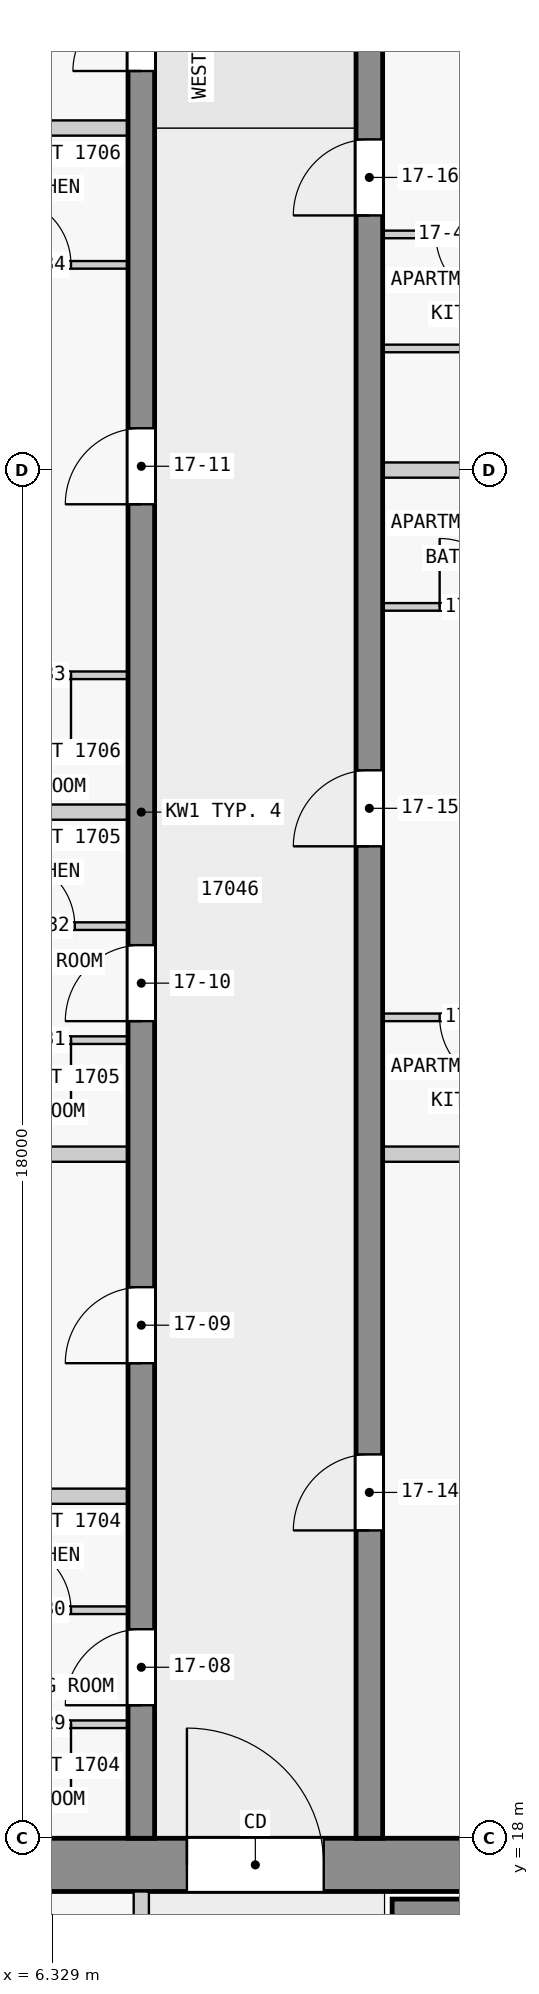
"""IFC4 building model, lengths in metres.
Left out: names, types, materials, properties, quantities, classifications, styles, units other than length and angle.
Written with IfcOpenShell. Run it as: python <this file> out.ifc"""

import sys

from ifc_helpers import new_model, si_unit, direction, frame, frame_2d, origin, place, context, subcontext, project, spatial, rectangle, extrude, element, fill, save


model = new_model("IFC4")
c1 = context("Model", 3, precision=1e-05, world=origin(), true_north=direction((0.0, 1.0)))
c2 = subcontext(c1, "Body", "Model", "MODEL_VIEW")
j1 = project(units=[si_unit("LENGTHUNIT", "METRE"), si_unit("PLANEANGLEUNIT", "RADIAN")], contexts=[c1])
p1 = place(None, origin())
s1 = spatial("IfcSite", under=j1, at=p1, CompositionType="ELEMENT")
p2 = place(p1, origin())
s2 = spatial("IfcBuilding", under=s1, at=p2, CompositionType="ELEMENT")
p3 = place(p2, frame((0.0, 0.0, 68.8)))
s3 = spatial("IfcBuildingStorey", under=s2, at=p3, CompositionType="ELEMENT", Elevation=68.8)
p4 = place(p3, frame((1.6, 17.65, 0.0), z_axis=(0.0, 0.0, 1.0), x_axis=(1.0, 0.0, 0.0)))
e1 = element("IfcWall", 1, at=p4, inside=s3, PredefinedType="SHEAR", context=c2, shape_type="SweptSolid", body=[
    extrude(rectangle(XDim=20.9, YDim=0.7, at=frame_2d((10.45, 0.0))), origin(), (0.0, 0.0, 1.0), 3.2),
])
p5 = place(p4, frame((6.5, 0.0, 0.0)))
e2 = element("IfcOpeningElement", 2, at=p5, cuts=e1, PredefinedType="OPENING", context=c2, shape_type="SweptSolid", body=[
    extrude(rectangle(XDim=1.8, YDim=2.1, at=frame_2d((0.9, 1.05))), frame((0.0, 0.36, 0.0), z_axis=(0.0, -1.0, 0.0), x_axis=(1.0, 0.0, 0.0)), (0.0, 0.0, 1.0), 0.72),
])
p6 = place(p3, frame((10.8, 17.05, 0.0), z_axis=(0.0, 0.0, 1.0), x_axis=(1.0, 0.0, 0.0)))
e3 = element("IfcWall", 3, at=p6, inside=s3, PredefinedType="SHEAR", context=c2, shape_type="SweptSolid", body=[
    extrude(rectangle(XDim=7.8, YDim=0.3, at=frame_2d((3.9, 0.0))), origin(), (0.0, 0.0, 1.0), 3.2),
])
p7 = place(p3, frame((7.5, 18.0, 0.0), z_axis=(0.0, 0.0, 1.0), x_axis=(0.0, 1.0, 0.0)))
e4 = element("IfcWall", 4, at=p7, inside=s3, PredefinedType="SHEAR", context=c2, shape_type="SweptSolid", body=[
    extrude(rectangle(XDim=27.0, YDim=0.35, at=frame_2d((13.5, 0.0))), origin(), (0.0, 0.0, 1.0), 3.2),
])
p8 = place(p7, frame((1.75, 0.0, 0.0)))
e5 = element("IfcOpeningElement", 5, at=p8, cuts=e4, PredefinedType="OPENING", context=c2, shape_type="SweptSolid", body=[
    extrude(rectangle(XDim=1.0, YDim=2.1, at=frame_2d((0.5, 1.05))), frame((0.0, 0.185, 0.0), z_axis=(0.0, -1.0, 0.0), x_axis=(1.0, 0.0, 0.0)), (0.0, 0.0, 1.0), 0.37),
])
p9 = place(p7, frame((6.25, 0.0, 0.0)))
e6 = element("IfcOpeningElement", 6, at=p9, cuts=e4, PredefinedType="OPENING", context=c2, shape_type="SweptSolid", body=[
    extrude(rectangle(XDim=1.0, YDim=2.1, at=frame_2d((0.5, 1.05))), frame((0.0, 0.185, 0.0), z_axis=(0.0, -1.0, 0.0), x_axis=(1.0, 0.0, 0.0)), (0.0, 0.0, 1.0), 0.37),
])
p10 = place(p7, frame((10.75, 0.0, 0.0)))
e7 = element("IfcOpeningElement", 7, at=p10, cuts=e4, PredefinedType="OPENING", context=c2, shape_type="SweptSolid", body=[
    extrude(rectangle(XDim=1.0, YDim=2.1, at=frame_2d((0.5, 1.05))), frame((0.0, 0.185, 0.0), z_axis=(0.0, -1.0, 0.0), x_axis=(1.0, 0.0, 0.0)), (0.0, 0.0, 1.0), 0.37),
])
p11 = place(p7, frame((17.55, 0.0, 0.0)))
e8 = element("IfcOpeningElement", 8, at=p11, cuts=e4, PredefinedType="OPENING", context=c2, shape_type="SweptSolid", body=[
    extrude(rectangle(XDim=1.0, YDim=2.1, at=frame_2d((0.5, 1.05))), frame((0.0, 0.185, 0.0), z_axis=(0.0, -1.0, 0.0), x_axis=(1.0, 0.0, 0.0)), (0.0, 0.0, 1.0), 0.37),
])
p12 = place(p7, frame((23.25, 0.0, 0.0)))
e9 = element("IfcOpeningElement", 9, at=p12, cuts=e4, PredefinedType="OPENING", context=c2, shape_type="SweptSolid", body=[
    extrude(rectangle(XDim=0.9, YDim=2.1, at=frame_2d((0.45, 1.05))), frame((0.0, 0.185, 0.0), z_axis=(0.0, -1.0, 0.0), x_axis=(1.0, 0.0, 0.0)), (0.0, 0.0, 1.0), 0.37),
])
p13 = place(p7, frame((25.45, 0.0, 0.0)))
e10 = element("IfcOpeningElement", 10, at=p13, cuts=e4, PredefinedType="OPENING", context=c2, shape_type="SweptSolid", body=[
    extrude(rectangle(XDim=1.0, YDim=2.1, at=frame_2d((0.5, 1.05))), frame((0.0, 0.185, 0.0), z_axis=(0.0, -1.0, 0.0), x_axis=(1.0, 0.0, 0.0)), (0.0, 0.0, 1.0), 0.37),
])
p14 = place(p3, frame((10.5, 18.0, 0.0), z_axis=(0.0, 0.0, 1.0), x_axis=(0.0, 1.0, 0.0)))
e11 = element("IfcWall", 11, at=p14, inside=s3, PredefinedType="SHEAR", context=c2, shape_type="SweptSolid", body=[
    extrude(rectangle(XDim=27.0, YDim=0.35, at=frame_2d((13.5, 0.0))), origin(), (0.0, 0.0, 1.0), 3.2),
])
p15 = place(p14, frame((4.05, 0.0, 0.0)))
e12 = element("IfcOpeningElement", 12, at=p15, cuts=e11, PredefinedType="OPENING", context=c2, shape_type="SweptSolid", body=[
    extrude(rectangle(XDim=1.0, YDim=2.1, at=frame_2d((0.5, 1.05))), frame((0.0, 0.185, 0.0), z_axis=(0.0, -1.0, 0.0), x_axis=(1.0, 0.0, 0.0)), (0.0, 0.0, 1.0), 0.37),
])
p16 = place(p14, frame((13.05, 0.0, 0.0)))
e13 = element("IfcOpeningElement", 13, at=p16, cuts=e11, PredefinedType="OPENING", context=c2, shape_type="SweptSolid", body=[
    extrude(rectangle(XDim=1.0, YDim=2.1, at=frame_2d((0.5, 1.05))), frame((0.0, 0.185, 0.0), z_axis=(0.0, -1.0, 0.0), x_axis=(1.0, 0.0, 0.0)), (0.0, 0.0, 1.0), 0.37),
])
p17 = place(p14, frame((21.35, 0.0, 0.0)))
e14 = element("IfcOpeningElement", 14, at=p17, cuts=e11, PredefinedType="OPENING", context=c2, shape_type="SweptSolid", body=[
    extrude(rectangle(XDim=1.0, YDim=2.1, at=frame_2d((0.5, 1.05))), frame((0.0, 0.185, 0.0), z_axis=(0.0, -1.0, 0.0), x_axis=(1.0, 0.0, 0.0)), (0.0, 0.0, 1.0), 0.37),
])
p18 = place(p3, frame((7.5, 10.1, 0.0), z_axis=(0.0, 0.0, 1.0), x_axis=(0.0, 1.0, 0.0)))
e15 = element("IfcWall", 15, at=p18, inside=s3, PredefinedType="PARTITIONING", context=c2, shape_type="SweptSolid", body=[
    extrude(rectangle(XDim=7.2, YDim=0.2, at=frame_2d((3.6, 0.0))), origin(), (0.0, 0.0, 1.0), 3.2),
])
p19 = place(p18, frame((0.75, 0.0, 0.0)))
e16 = element("IfcOpeningElement", 16, at=p19, cuts=e15, PredefinedType="OPENING", context=c2, shape_type="SweptSolid", body=[
    extrude(rectangle(XDim=0.9, YDim=2.1, at=frame_2d((0.45, 1.05))), frame((0.0, 0.11, 0.0), z_axis=(0.0, -1.0, 0.0), x_axis=(1.0, 0.0, 0.0)), (0.0, 0.0, 1.0), 0.22),
])
p20 = place(p18, frame((4.35, 0.0, 0.0)))
e17 = element("IfcOpeningElement", 17, at=p20, cuts=e15, PredefinedType="OPENING", context=c2, shape_type="SweptSolid", body=[
    extrude(rectangle(XDim=0.9, YDim=2.1, at=frame_2d((0.45, 1.05))), frame((0.0, 0.11, 0.0), z_axis=(0.0, -1.0, 0.0), x_axis=(1.0, 0.0, 0.0)), (0.0, 0.0, 1.0), 0.22),
])
p21 = place(p3, frame((7.325, 19.5, 0.0), z_axis=(0.0, 0.0, 1.0), x_axis=(-1.0, 0.0, 0.0)))
e18 = element("IfcWall", 18, at=p21, inside=s3, PredefinedType="PARTITIONING", context=c2, shape_type="SweptSolid", body=[
    extrude(rectangle(XDim=2.4, YDim=0.1, at=frame_2d((1.2, 0.0))), origin(), (0.0, 0.0, 1.0), 3.2),
])
p22 = place(p21, frame((0.75, 0.0, 0.0)))
e19 = element("IfcOpeningElement", 19, at=p22, cuts=e18, PredefinedType="OPENING", context=c2, shape_type="SweptSolid", body=[
    extrude(rectangle(XDim=0.9, YDim=2.1, at=frame_2d((0.45, 1.05))), frame((0.0, 0.06, 0.0), z_axis=(0.0, -1.0, 0.0), x_axis=(1.0, 0.0, 0.0)), (0.0, 0.0, 1.0), 0.12),
])
p23 = place(p3, frame((4.925, 21.0, 0.0), z_axis=(0.0, 0.0, 1.0), x_axis=(1.0, 0.0, 0.0)))
e20 = element("IfcWall", 20, at=p23, inside=s3, PredefinedType="PARTITIONING", context=c2, shape_type="SweptSolid", body=[
    extrude(rectangle(XDim=2.4, YDim=0.1, at=frame_2d((1.2, 0.0))), origin(), (0.0, 0.0, 1.0), 3.2),
])
p24 = place(p23, frame((0.75, 0.0, 0.0)))
e21 = element("IfcOpeningElement", 21, at=p24, cuts=e20, PredefinedType="OPENING", context=c2, shape_type="SweptSolid", body=[
    extrude(rectangle(XDim=0.9, YDim=2.1, at=frame_2d((0.45, 1.05))), frame((0.0, 0.06, 0.0), z_axis=(0.0, -1.0, 0.0), x_axis=(1.0, 0.0, 0.0)), (0.0, 0.0, 1.0), 0.12),
])
p25 = place(p3, frame((7.325, 22.5, 0.0), z_axis=(0.0, 0.0, 1.0), x_axis=(-1.0, 0.0, 0.0)))
e22 = element("IfcWall", 22, at=p25, inside=s3, PredefinedType="PARTITIONING", context=c2, shape_type="SweptSolid", body=[
    extrude(rectangle(XDim=2.3, YDim=0.2, at=frame_2d((1.15, 0.0))), origin(), (0.0, 0.0, 1.0), 3.2),
])
for number, where, z_axis, x_axis in (
    (23, (7.325, 27.0, 0.0), (0.0, 0.0, 1.0), (-1.0, 0.0, 0.0)),
    (24, (18.08, 27.0, 0.0), (0.0, 0.0, 1.0), (-1.0, 0.0, 0.0)),
):
    element("IfcWall", number, at=place(p3, frame(where, z_axis=z_axis, x_axis=x_axis)), inside=s3, PredefinedType="PARTITIONING", context=c2, shape_type="SweptSolid", body=[
        extrude(rectangle(XDim=7.405, YDim=0.2, at=frame_2d((3.703, 0.0))), origin(), (0.0, 0.0, 1.0), 3.2),
    ])
p26 = place(p3, frame((7.325, 28.5, 0.0), z_axis=(0.0, 0.0, 1.0), x_axis=(-1.0, 0.0, 0.0)))
e25 = element("IfcWall", 25, at=p26, inside=s3, PredefinedType="PARTITIONING", context=c2, shape_type="SweptSolid", body=[
    extrude(rectangle(XDim=2.4, YDim=0.1, at=frame_2d((1.2, 0.0))), origin(), (0.0, 0.0, 1.0), 3.2),
])
p27 = place(p26, frame((0.75, 0.0, 0.0)))
e26 = element("IfcOpeningElement", 26, at=p27, cuts=e25, PredefinedType="OPENING", context=c2, shape_type="SweptSolid", body=[
    extrude(rectangle(XDim=0.9, YDim=2.1, at=frame_2d((0.45, 1.05))), frame((0.0, 0.06, 0.0), z_axis=(0.0, -1.0, 0.0), x_axis=(1.0, 0.0, 0.0)), (0.0, 0.0, 1.0), 0.12),
])
p28 = place(p3, frame((13.075, 28.8, 0.0), z_axis=(0.0, 0.0, 1.0), x_axis=(-1.0, 0.0, 0.0)))
e27 = element("IfcWall", 27, at=p28, inside=s3, PredefinedType="PARTITIONING", context=c2, shape_type="SweptSolid", body=[
    extrude(rectangle(XDim=2.4, YDim=0.1, at=frame_2d((1.2, 0.0))), origin(), (0.0, 0.0, 1.0), 3.2),
])
p29 = place(p28, frame((0.75, 0.0, 0.0)))
e28 = element("IfcOpeningElement", 28, at=p29, cuts=e27, PredefinedType="OPENING", context=c2, shape_type="SweptSolid", body=[
    extrude(rectangle(XDim=0.9, YDim=2.1, at=frame_2d((0.45, 1.05))), frame((0.0, 0.06, 0.0), z_axis=(0.0, -1.0, 0.0), x_axis=(1.0, 0.0, 0.0)), (0.0, 0.0, 1.0), 0.12),
])
p30 = place(p3, frame((4.975, 30.0, 0.0), z_axis=(0.0, 0.0, 1.0), x_axis=(1.0, 0.0, 0.0)))
e29 = element("IfcWall", 29, at=p30, inside=s3, PredefinedType="PARTITIONING", context=c2, shape_type="SweptSolid", body=[
    extrude(rectangle(XDim=2.35, YDim=0.1, at=frame_2d((1.175, 0.0))), origin(), (0.0, 0.0, 1.0), 3.2),
])
p31 = place(p30, frame((0.75, 0.0, 0.0)))
e30 = element("IfcOpeningElement", 30, at=p31, cuts=e29, PredefinedType="OPENING", context=c2, shape_type="SweptSolid", body=[
    extrude(rectangle(XDim=0.9, YDim=2.1, at=frame_2d((0.45, 1.05))), frame((0.0, 0.06, 0.0), z_axis=(0.0, -1.0, 0.0), x_axis=(1.0, 0.0, 0.0)), (0.0, 0.0, 1.0), 0.12),
])
p32 = place(p3, frame((7.325, 31.5, 0.0), z_axis=(0.0, 0.0, 1.0), x_axis=(-1.0, 0.0, 0.0)))
e31 = element("IfcWall", 31, at=p32, inside=s3, PredefinedType="PARTITIONING", context=c2, shape_type="SweptSolid", body=[
    extrude(rectangle(XDim=2.3, YDim=0.2, at=frame_2d((1.15, 0.0))), origin(), (0.0, 0.0, 1.0), 3.2),
])
p33 = place(p3, frame((7.325, 33.3, 0.0), z_axis=(0.0, 0.0, 1.0), x_axis=(-1.0, 0.0, 0.0)))
e32 = element("IfcWall", 32, at=p33, inside=s3, PredefinedType="PARTITIONING", context=c2, shape_type="SweptSolid", body=[
    extrude(rectangle(XDim=2.35, YDim=0.1, at=frame_2d((1.175, 0.0))), origin(), (0.0, 0.0, 1.0), 3.2),
])
p34 = place(p33, frame((0.75, 0.0, 0.0)))
e33 = element("IfcOpeningElement", 33, at=p34, cuts=e32, PredefinedType="OPENING", context=c2, shape_type="SweptSolid", body=[
    extrude(rectangle(XDim=0.9, YDim=2.1, at=frame_2d((0.45, 1.05))), frame((0.0, 0.06, 0.0), z_axis=(0.0, -1.0, 0.0), x_axis=(1.0, 0.0, 0.0)), (0.0, 0.0, 1.0), 0.12),
])
p35 = place(p3, frame((10.675, 34.2, 0.0), z_axis=(0.0, 0.0, 1.0), x_axis=(1.0, 0.0, 0.0)))
e34 = element("IfcWall", 34, at=p35, inside=s3, PredefinedType="PARTITIONING", context=c2, shape_type="SweptSolid", body=[
    extrude(rectangle(XDim=2.35, YDim=0.1, at=frame_2d((1.175, 0.0))), origin(), (0.0, 0.0, 1.0), 3.2),
])
p36 = place(p35, frame((0.75, 0.0, 0.0)))
e35 = element("IfcOpeningElement", 35, at=p36, cuts=e34, PredefinedType="OPENING", context=c2, shape_type="SweptSolid", body=[
    extrude(rectangle(XDim=0.9, YDim=2.1, at=frame_2d((0.45, 1.05))), frame((0.0, 0.06, 0.0), z_axis=(0.0, -1.0, 0.0), x_axis=(1.0, 0.0, 0.0)), (0.0, 0.0, 1.0), 0.12),
])
p37 = place(p3, frame((16.6, 36.0, 0.0), z_axis=(0.0, 0.0, 1.0), x_axis=(-1.0, 0.0, 0.0)))
e36 = element("IfcWall", 36, at=p37, inside=s3, PredefinedType="PARTITIONING", context=c2, shape_type="SweptSolid", body=[
    extrude(rectangle(XDim=5.925, YDim=0.2, at=frame_2d((2.962, 0.0))), origin(), (0.0, 0.0, 1.0), 3.2),
])
p38 = place(p3, frame((13.025, 37.6, 0.0), z_axis=(0.0, 0.0, 1.0), x_axis=(-1.0, 0.0, 0.0)))
e37 = element("IfcWall", 37, at=p38, inside=s3, PredefinedType="PARTITIONING", context=c2, shape_type="SweptSolid", body=[
    extrude(rectangle(XDim=2.35, YDim=0.1, at=frame_2d((1.175, 0.0))), origin(), (0.0, 0.0, 1.0), 3.2),
])
p39 = place(p3, frame((4.925, 38.7, 0.0), z_axis=(0.0, 0.0, 1.0), x_axis=(1.0, 0.0, 0.0)))
e38 = element("IfcWall", 38, at=p39, inside=s3, PredefinedType="PARTITIONING", context=c2, shape_type="SweptSolid", body=[
    extrude(rectangle(XDim=2.4, YDim=0.1, at=frame_2d((1.2, 0.0))), origin(), (0.0, 0.0, 1.0), 3.2),
])
p40 = place(p39, frame((0.75, 0.0, 0.0)))
e39 = element("IfcOpeningElement", 39, at=p40, cuts=e38, PredefinedType="OPENING", context=c2, shape_type="SweptSolid", body=[
    extrude(rectangle(XDim=0.9, YDim=2.1, at=frame_2d((0.45, 1.05))), frame((0.0, 0.06, 0.0), z_axis=(0.0, -1.0, 0.0), x_axis=(1.0, 0.0, 0.0)), (0.0, 0.0, 1.0), 0.12),
])
p41 = place(p3, frame((13.025, 39.1, 0.0), z_axis=(0.0, 0.0, 1.0), x_axis=(-1.0, 0.0, 0.0)))
e40 = element("IfcWall", 40, at=p41, inside=s3, PredefinedType="PARTITIONING", context=c2, shape_type="SweptSolid", body=[
    extrude(rectangle(XDim=2.35, YDim=0.1, at=frame_2d((1.175, 0.0))), origin(), (0.0, 0.0, 1.0), 3.2),
])
p42 = place(p41, frame((0.75, 0.0, 0.0)))
e41 = element("IfcOpeningElement", 41, at=p42, cuts=e40, PredefinedType="OPENING", context=c2, shape_type="SweptSolid", body=[
    extrude(rectangle(XDim=0.9, YDim=2.1, at=frame_2d((0.45, 1.05))), frame((0.0, 0.06, 0.0), z_axis=(0.0, -1.0, 0.0), x_axis=(1.0, 0.0, 0.0)), (0.0, 0.0, 1.0), 0.12),
])
p43 = place(p3, frame((7.325, 40.5, 0.0), z_axis=(0.0, 0.0, 1.0), x_axis=(-1.0, 0.0, 0.0)))
e42 = element("IfcWall", 42, at=p43, inside=s3, PredefinedType="PARTITIONING", context=c2, shape_type="SweptSolid", body=[
    extrude(rectangle(XDim=2.3, YDim=0.2, at=frame_2d((1.15, 0.0))), origin(), (0.0, 0.0, 1.0), 3.2),
])
p44 = place(p5, origin())
e43 = element("IfcDoor", 43, at=p44, inside=s3, OperationType="DOUBLE_DOOR_SINGLE_SWING", PredefinedType="DOOR", context=c2, shape_type="SweptSolid", body=[
    extrude(rectangle(XDim=1.8, YDim=2.1, at=frame_2d((0.9, 1.05))), frame((0.0, 0.025, 0.0), z_axis=(0.0, -1.0, 0.0), x_axis=(1.0, 0.0, 0.0)), (0.0, 0.0, 1.0), 0.05),
])
fill(e2, e43)
p45 = place(p8, origin())
e44 = element("IfcDoor", 44, at=p45, inside=s3, OperationType="SINGLE_SWING_LEFT", PredefinedType="DOOR", context=c2, shape_type="SweptSolid", body=[
    extrude(rectangle(XDim=1.0, YDim=2.1, at=frame_2d((0.5, 1.05))), frame((0.0, 0.025, 0.0), z_axis=(0.0, -1.0, 0.0), x_axis=(1.0, 0.0, 0.0)), (0.0, 0.0, 1.0), 0.05),
])
fill(e5, e44)
p46 = place(p9, origin())
e45 = element("IfcDoor", 45, at=p46, inside=s3, OperationType="SINGLE_SWING_LEFT", PredefinedType="DOOR", context=c2, shape_type="SweptSolid", body=[
    extrude(rectangle(XDim=1.0, YDim=2.1, at=frame_2d((0.5, 1.05))), frame((0.0, 0.025, 0.0), z_axis=(0.0, -1.0, 0.0), x_axis=(1.0, 0.0, 0.0)), (0.0, 0.0, 1.0), 0.05),
])
fill(e6, e45)
p47 = place(p10, origin())
e46 = element("IfcDoor", 46, at=p47, inside=s3, OperationType="SINGLE_SWING_LEFT", PredefinedType="DOOR", context=c2, shape_type="SweptSolid", body=[
    extrude(rectangle(XDim=1.0, YDim=2.1, at=frame_2d((0.5, 1.05))), frame((0.0, 0.025, 0.0), z_axis=(0.0, -1.0, 0.0), x_axis=(1.0, 0.0, 0.0)), (0.0, 0.0, 1.0), 0.05),
])
fill(e7, e46)
p48 = place(p11, origin())
e47 = element("IfcDoor", 47, at=p48, inside=s3, OperationType="SINGLE_SWING_RIGHT", PredefinedType="DOOR", context=c2, shape_type="SweptSolid", body=[
    extrude(rectangle(XDim=1.0, YDim=2.1, at=frame_2d((0.5, 1.05))), frame((0.0, 0.025, 0.0), z_axis=(0.0, -1.0, 0.0), x_axis=(1.0, 0.0, 0.0)), (0.0, 0.0, 1.0), 0.05),
])
fill(e8, e47)
p49 = place(p12, origin())
e48 = element("IfcDoor", 48, at=p49, inside=s3, OperationType="SINGLE_SWING_RIGHT", PredefinedType="DOOR", context=c2, shape_type="SweptSolid", body=[
    extrude(rectangle(XDim=0.9, YDim=2.1, at=frame_2d((0.45, 1.05))), frame((0.0, 0.025, 0.0), z_axis=(0.0, -1.0, 0.0), x_axis=(1.0, 0.0, 0.0)), (0.0, 0.0, 1.0), 0.05),
])
fill(e9, e48)
p50 = place(p15, origin())
e49 = element("IfcDoor", 49, at=p50, inside=s3, OperationType="SINGLE_SWING_LEFT", PredefinedType="DOOR", context=c2, shape_type="SweptSolid", body=[
    extrude(rectangle(XDim=1.0, YDim=2.1, at=frame_2d((0.5, 1.05))), frame((0.0, 0.025, 0.0), z_axis=(0.0, -1.0, 0.0), x_axis=(1.0, 0.0, 0.0)), (0.0, 0.0, 1.0), 0.05),
])
fill(e12, e49)
p51 = place(p16, origin())
e50 = element("IfcDoor", 50, at=p51, inside=s3, OperationType="SINGLE_SWING_RIGHT", PredefinedType="DOOR", context=c2, shape_type="SweptSolid", body=[
    extrude(rectangle(XDim=1.0, YDim=2.1, at=frame_2d((0.5, 1.05))), frame((0.0, 0.025, 0.0), z_axis=(0.0, -1.0, 0.0), x_axis=(1.0, 0.0, 0.0)), (0.0, 0.0, 1.0), 0.05),
])
fill(e13, e50)
p52 = place(p17, origin())
e51 = element("IfcDoor", 51, at=p52, inside=s3, OperationType="SINGLE_SWING_RIGHT", PredefinedType="DOOR", context=c2, shape_type="SweptSolid", body=[
    extrude(rectangle(XDim=1.0, YDim=2.1, at=frame_2d((0.5, 1.05))), frame((0.0, 0.025, 0.0), z_axis=(0.0, -1.0, 0.0), x_axis=(1.0, 0.0, 0.0)), (0.0, 0.0, 1.0), 0.05),
])
fill(e14, e51)
p53 = place(p22, origin())
e52 = element("IfcDoor", 52, at=p53, inside=s3, OperationType="SINGLE_SWING_LEFT", PredefinedType="DOOR", context=c2, shape_type="SweptSolid", body=[
    extrude(rectangle(XDim=0.9, YDim=2.1, at=frame_2d((0.45, 1.05))), frame((0.0, 0.025, 0.0), z_axis=(0.0, -1.0, 0.0), x_axis=(1.0, 0.0, 0.0)), (0.0, 0.0, 1.0), 0.05),
])
fill(e19, e52)
p54 = place(p24, origin())
e53 = element("IfcDoor", 53, at=p54, inside=s3, OperationType="SINGLE_SWING_LEFT", PredefinedType="DOOR", context=c2, shape_type="SweptSolid", body=[
    extrude(rectangle(XDim=0.9, YDim=2.1, at=frame_2d((0.45, 1.05))), frame((0.0, 0.025, 0.0), z_axis=(0.0, -1.0, 0.0), x_axis=(1.0, 0.0, 0.0)), (0.0, 0.0, 1.0), 0.05),
])
fill(e21, e53)
p55 = place(p27, origin())
e54 = element("IfcDoor", 54, at=p55, inside=s3, OperationType="SINGLE_SWING_LEFT", PredefinedType="DOOR", context=c2, shape_type="SweptSolid", body=[
    extrude(rectangle(XDim=0.9, YDim=2.1, at=frame_2d((0.45, 1.05))), frame((0.0, 0.025, 0.0), z_axis=(0.0, -1.0, 0.0), x_axis=(1.0, 0.0, 0.0)), (0.0, 0.0, 1.0), 0.05),
])
fill(e26, e54)
p56 = place(p31, origin())
e55 = element("IfcDoor", 55, at=p56, inside=s3, OperationType="SINGLE_SWING_RIGHT", PredefinedType="DOOR", context=c2, shape_type="SweptSolid", body=[
    extrude(rectangle(XDim=0.9, YDim=2.1, at=frame_2d((0.45, 1.05))), frame((0.0, 0.025, 0.0), z_axis=(0.0, -1.0, 0.0), x_axis=(1.0, 0.0, 0.0)), (0.0, 0.0, 1.0), 0.05),
])
fill(e30, e55)
p57 = place(p34, origin())
e56 = element("IfcDoor", 56, at=p57, inside=s3, OperationType="SINGLE_SWING_RIGHT", PredefinedType="DOOR", context=c2, shape_type="SweptSolid", body=[
    extrude(rectangle(XDim=0.9, YDim=2.1, at=frame_2d((0.45, 1.05))), frame((0.0, 0.025, 0.0), z_axis=(0.0, -1.0, 0.0), x_axis=(1.0, 0.0, 0.0)), (0.0, 0.0, 1.0), 0.05),
])
fill(e33, e56)
p58 = place(p40, origin())
e57 = element("IfcDoor", 57, at=p58, inside=s3, OperationType="SINGLE_SWING_LEFT", PredefinedType="DOOR", context=c2, shape_type="SweptSolid", body=[
    extrude(rectangle(XDim=0.9, YDim=2.1, at=frame_2d((0.45, 1.05))), frame((0.0, 0.025, 0.0), z_axis=(0.0, -1.0, 0.0), x_axis=(1.0, 0.0, 0.0)), (0.0, 0.0, 1.0), 0.05),
])
fill(e39, e57)
p59 = place(p29, origin())
e58 = element("IfcDoor", 58, at=p59, inside=s3, OperationType="SINGLE_SWING_RIGHT", PredefinedType="DOOR", context=c2, shape_type="SweptSolid", body=[
    extrude(rectangle(XDim=0.9, YDim=2.1, at=frame_2d((0.45, 1.05))), frame((0.0, 0.025, 0.0), z_axis=(0.0, -1.0, 0.0), x_axis=(1.0, 0.0, 0.0)), (0.0, 0.0, 1.0), 0.05),
])
fill(e28, e58)
p60 = place(p36, origin())
e59 = element("IfcDoor", 59, at=p60, inside=s3, OperationType="SINGLE_SWING_RIGHT", PredefinedType="DOOR", context=c2, shape_type="SweptSolid", body=[
    extrude(rectangle(XDim=0.9, YDim=2.1, at=frame_2d((0.45, 1.05))), frame((0.0, 0.025, 0.0), z_axis=(0.0, -1.0, 0.0), x_axis=(1.0, 0.0, 0.0)), (0.0, 0.0, 1.0), 0.05),
])
fill(e35, e59)
p61 = place(p42, origin())
e60 = element("IfcDoor", 60, at=p61, inside=s3, OperationType="SINGLE_SWING_RIGHT", PredefinedType="DOOR", context=c2, shape_type="SweptSolid", body=[
    extrude(rectangle(XDim=0.9, YDim=2.1, at=frame_2d((0.45, 1.05))), frame((0.0, 0.025, 0.0), z_axis=(0.0, -1.0, 0.0), x_axis=(1.0, 0.0, 0.0)), (0.0, 0.0, 1.0), 0.05),
])
fill(e41, e60)
save(model, sys.argv[1])
